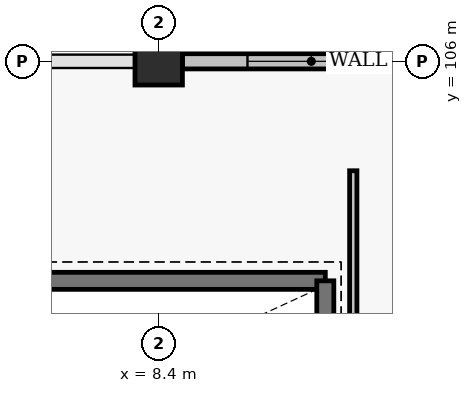
"""IFC4 building model, lengths in metres.
Left out: names, types, materials, properties, quantities, classifications, styles, units other than length and angle.
Written with IfcOpenShell. Run it as: python <this file> out.ifc"""

import sys

from ifc_helpers import new_model, si_unit, direction, frame, frame_2d, origin, origin_2d, place, context, subcontext, project, spatial, rectangle, circle, extrude, element, fill, save


model = new_model("IFC4")
c1 = context("Model", 3, precision=1e-05, world=origin(), true_north=direction((0.0, 1.0)))
c2 = subcontext(c1, "Body", "Model", "MODEL_VIEW")
j1 = project(units=[si_unit("LENGTHUNIT", "METRE"), si_unit("PLANEANGLEUNIT", "RADIAN")], contexts=[c1])
p1 = place(None, origin())
s1 = spatial("IfcSite", under=j1, at=p1, CompositionType="ELEMENT")
p2 = place(p1, origin())
s2 = spatial("IfcBuilding", under=s1, at=p2, CompositionType="ELEMENT")
p3 = place(p2, frame((0.0, 0.0, 9.6)))
s3 = spatial("IfcBuildingStorey", under=s2, at=p3, CompositionType="ELEMENT", Elevation=9.6)
p4 = place(p3, frame((8.4, 106.0, 0.0), z_axis=(0.0, 0.0, 1.0), x_axis=(1.0, 0.0, 0.0)))
e1 = element("IfcColumn", 1, at=p4, inside=s3, PredefinedType="COLUMN", context=c2, shape_type="SweptSolid", body=[
    extrude(circle(Radius=0.39, at=origin_2d()), origin(), (0.0, 0.0, 1.0), 8.422),
])
p5 = place(p3, frame((16.41, 106.0, 0.0), z_axis=(0.0, 0.0, 1.0), x_axis=(-1.0, 0.0, 0.0)))
e2 = element("IfcWall", 2, at=p5, inside=s3, PredefinedType="SOLIDWALL", context=c2, shape_type="SweptSolid", body=[
    extrude(rectangle(XDim=7.62, YDim=0.25, at=frame_2d((3.81, 0.0))), origin(), (0.0, 0.0, 1.0), 5.243),
])
p6 = place(p5, frame((1.8, 0.0, 0.0)))
e3 = element("IfcOpeningElement", 3, at=p6, cuts=e2, PredefinedType="OPENING", context=c2, shape_type="SweptSolid", body=[
    extrude(rectangle(XDim=1.9, YDim=2.15, at=frame_2d((0.95, 1.075))), frame((0.0, 0.135, 0.0), z_axis=(0.0, -1.0, 0.0), x_axis=(1.0, 0.0, 0.0)), (0.0, 0.0, 1.0), 0.27),
])
p7 = place(p5, frame((4.45, 0.0, 0.9)))
e4 = element("IfcOpeningElement", 4, at=p7, cuts=e2, PredefinedType="OPENING", context=c2, shape_type="SweptSolid", body=[
    extrude(rectangle(XDim=2.1, YDim=1.6, at=frame_2d((1.05, 0.8))), frame((0.0, 0.135, 0.0), z_axis=(0.0, -1.0, 0.0), x_axis=(1.0, 0.0, 0.0)), (0.0, 0.0, 1.0), 0.27),
])
p8 = place(p3, frame((2.26, 102.39, 0.0), z_axis=(0.0, 0.0, 1.0), x_axis=(1.0, 0.0, 0.0)))
e5 = element("IfcWall", 5, at=p8, inside=s3, PredefinedType="SHEAR", context=c2, shape_type="SweptSolid", body=[
    extrude(rectangle(XDim=8.88, YDim=0.28, at=frame_2d((4.44, 0.0))), origin(), (0.0, 0.0, 1.0), 2.75),
])
p9 = place(p3, frame((11.14, 98.86, 0.0), z_axis=(0.0, 0.0, 1.0), x_axis=(0.0, 1.0, 0.0)))
e6 = element("IfcWall", 6, at=p9, inside=s3, PredefinedType="SHEAR", context=c2, shape_type="SweptSolid", body=[
    extrude(rectangle(XDim=3.53, YDim=0.28, at=frame_2d((1.765, 0.0))), origin(), (0.0, 0.0, 1.0), 2.75),
])
p10 = place(p3, frame((11.6, 90.7, 0.0), z_axis=(0.0, 0.0, 1.0), x_axis=(0.0, 1.0, 0.0)))
e7 = element("IfcWall", 7, at=p10, inside=s3, PredefinedType="PARTITIONING", context=c2, shape_type="SweptSolid", body=[
    extrude(rectangle(XDim=13.5, YDim=0.12, at=frame_2d((6.75, 0.0))), origin(), (0.0, 0.0, 1.0), 2.45),
])
p11 = place(p10, frame((2.4, 0.0, 0.0)))
e8 = element("IfcOpeningElement", 8, at=p11, cuts=e7, PredefinedType="OPENING", context=c2, shape_type="SweptSolid", body=[
    extrude(rectangle(XDim=2.1, YDim=2.22, at=frame_2d((1.05, 1.11))), frame((0.0, 0.07, 0.0), z_axis=(0.0, -1.0, 0.0), x_axis=(1.0, 0.0, 0.0)), (0.0, 0.0, 1.0), 0.14),
])
p12 = place(p7, origin())
e9 = element("IfcWindow", 9, at=p12, inside=s3, PartitioningType="DOUBLE_PANEL_VERTICAL", PredefinedType="WINDOW", context=c2, shape_type="SweptSolid", body=[
    extrude(rectangle(XDim=2.1, YDim=1.6, at=frame_2d((1.05, 0.8))), frame((0.0, 0.03, 0.0), z_axis=(0.0, -1.0, 0.0), x_axis=(1.0, 0.0, 0.0)), (0.0, 0.0, 1.0), 0.06),
])
fill(e4, e9)
save(model, sys.argv[1])
